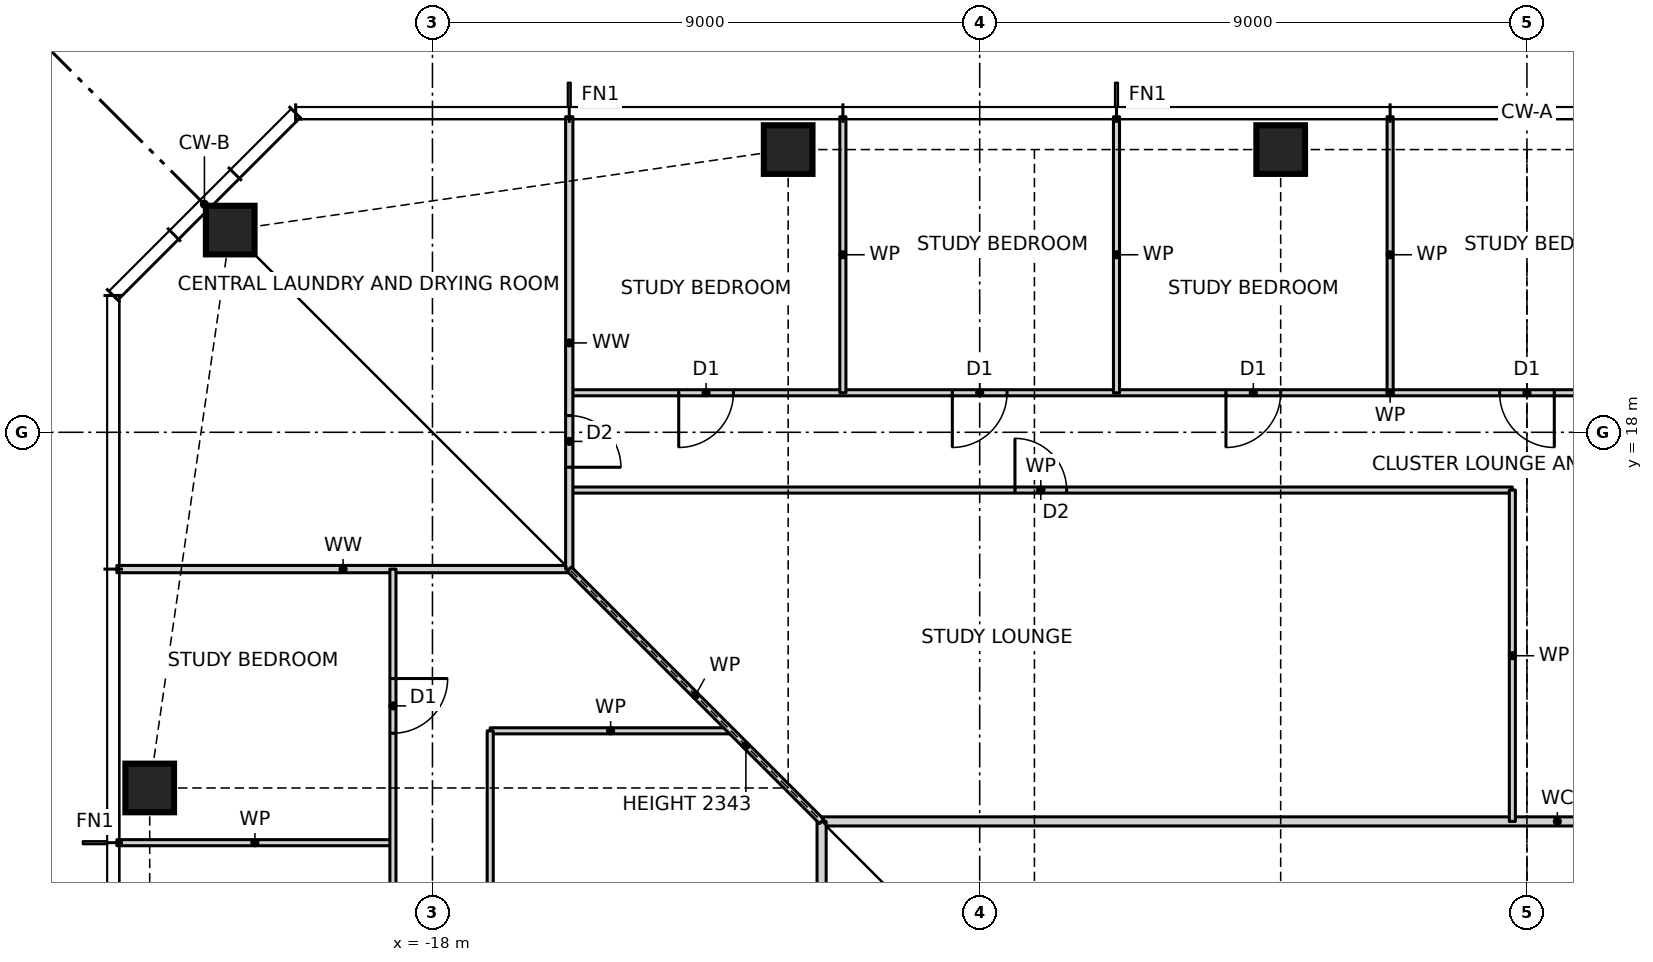
"""IFC4 building model, lengths in metres.
Left out: names, types, materials, properties, quantities, classifications, styles, units other than length and angle.
Written with IfcOpenShell. Run it as: python <this file> out.ifc"""

import sys

from ifc_helpers import new_model, si_unit, direction, frame, frame_2d, origin, origin_2d, place, context, subcontext, project, spatial, rectangle, hollow_rectangle, extrude, element, fill, save


model = new_model("IFC4")
c1 = context("Model", 3, precision=1e-05, world=origin(), true_north=direction((0.0, 1.0)))
c2 = subcontext(c1, "Body", "Model", "MODEL_VIEW")
j1 = project(units=[si_unit("LENGTHUNIT", "METRE"), si_unit("PLANEANGLEUNIT", "RADIAN")], contexts=[c1])
p1 = place(None, origin())
s1 = spatial("IfcSite", under=j1, at=p1, CompositionType="ELEMENT")
p2 = place(p1, origin())
s2 = spatial("IfcBuilding", under=s1, at=p2, CompositionType="ELEMENT")
p3 = place(p2, frame((0.0, 0.0, 25.5)))
s3 = spatial("IfcBuildingStorey", under=s2, at=p3, CompositionType="ELEMENT", Elevation=25.5)
for number, where, z_axis, x_axis in (
    (1, (-4.05, 22.65, 0.0), (0.0, 0.0, 1.0), (1.0, 0.0, 0.0)),
    (2, (-12.15, 22.65, 0.0), (0.0, 0.0, 1.0), (1.0, 0.0, 0.0)),
    (3, (-21.326, 21.326, 0.0), (0.0, 0.0, 1.0), (1.0, 0.0, 0.0)),
    (4, (-22.65, 12.15, 0.0), (0.0, 0.0, 1.0), (1.0, 0.0, 0.0)),
):
    element("IfcColumn", number, at=place(p3, frame(where, z_axis=z_axis, x_axis=x_axis)), inside=s3, PredefinedType="COLUMN", context=c2, shape_type="SweptSolid", body=[
        extrude(hollow_rectangle(XDim=0.8, YDim=0.8, WallThickness=0.09, at=origin_2d()), origin(), (0.0, 0.0, 1.0), 3.5),
    ])
p4 = place(p3, frame((-23.19, 11.25, 0.0), z_axis=(0.0, 0.0, 1.0), x_axis=(1.0, 0.0, 0.0)))
e5 = element("IfcWall", 5, at=p4, inside=s3, PredefinedType="PARTITIONING", context=c2, shape_type="SweptSolid", body=[
    extrude(rectangle(XDim=4.54, YDim=0.1, at=frame_2d((2.27, 0.0))), origin(), (0.0, 0.0, 1.0), 3.27),
])
p5 = place(p3, frame((-11.6, 11.6, 0.0), z_axis=(0.0, 0.0, 1.0), x_axis=(1.0, 0.0, 0.0)))
e6 = element("IfcWall", 6, at=p5, inside=s3, PredefinedType="PARTITIONING", context=c2, shape_type="SweptSolid", body=[
    extrude(rectangle(XDim=24.2, YDim=0.15, at=frame_2d((12.1, 0.0))), origin(), (0.0, 0.0, 1.0), 3.27),
])
p6 = place(p5, frame((12.855, 0.0, 0.0)))
e7 = element("IfcOpeningElement", 7, at=p6, cuts=e6, PredefinedType="OPENING", context=c2, shape_type="SweptSolid", body=[
    extrude(rectangle(XDim=1.0, YDim=2.1, at=frame_2d((0.5, 1.05))), frame((0.0, 0.085, 0.0), z_axis=(0.0, -1.0, 0.0), x_axis=(1.0, 0.0, 0.0)), (0.0, 0.0, 1.0), 0.17),
])
p7 = place(p3, frame((-17.05, 13.09, 0.0), z_axis=(0.0, 0.0, 1.0), x_axis=(1.0, 0.0, 0.0)))
e8 = element("IfcWall", 8, at=p7, inside=s3, PredefinedType="PARTITIONING", context=c2, shape_type="SweptSolid", body=[
    extrude(rectangle(XDim=3.96, YDim=0.1, at=frame_2d((1.98, 0.0))), origin(), (0.0, 0.0, 1.0), 3.27),
])
p8 = place(p3, frame((-23.19, 15.75, 0.0), z_axis=(0.0, 0.0, 1.0), x_axis=(1.0, 0.0, 0.0)))
e9 = element("IfcWall", 9, at=p8, inside=s3, PredefinedType="PARTITIONING", context=c2, shape_type="SweptSolid", body=[
    extrude(rectangle(XDim=7.44, YDim=0.12, at=frame_2d((3.72, 0.0))), origin(), (0.0, 0.0, 1.0), 3.27),
])
p9 = place(p3, frame((-15.75, 17.05, 0.0), z_axis=(0.0, 0.0, 1.0), x_axis=(1.0, 0.0, 0.0)))
e10 = element("IfcWall", 10, at=p9, inside=s3, PredefinedType="PARTITIONING", context=c2, shape_type="SweptSolid", body=[
    extrude(rectangle(XDim=15.51, YDim=0.1, at=frame_2d((7.755, 0.0))), origin(), (0.0, 0.0, 1.0), 3.27),
])
p10 = place(p9, frame((7.33, 0.0, 0.0)))
e11 = element("IfcOpeningElement", 11, at=p10, cuts=e10, PredefinedType="OPENING", context=c2, shape_type="SweptSolid", body=[
    extrude(rectangle(XDim=0.85, YDim=2.1, at=frame_2d((0.425, 1.05))), frame((0.0, 0.06, 0.0), z_axis=(0.0, -1.0, 0.0), x_axis=(1.0, 0.0, 0.0)), (0.0, 0.0, 1.0), 0.12),
])
p11 = place(p3, frame((-15.75, 18.65, 0.0), z_axis=(0.0, 0.0, 1.0), x_axis=(1.0, 0.0, 0.0)))
e12 = element("IfcWall", 12, at=p11, inside=s3, PredefinedType="PARTITIONING", context=c2, shape_type="SweptSolid", body=[
    extrude(rectangle(XDim=27.0, YDim=0.1, at=frame_2d((13.5, 0.0))), origin(), (0.0, 0.0, 1.0), 3.27),
])
p12 = place(p11, frame((24.3, 0.0, 0.0)))
e13 = element("IfcOpeningElement", 13, at=p12, cuts=e12, PredefinedType="OPENING", context=c2, shape_type="SweptSolid", body=[
    extrude(rectangle(XDim=0.9, YDim=2.1, at=frame_2d((0.45, 1.05))), frame((0.0, 0.06, 0.0), z_axis=(0.0, -1.0, 0.0), x_axis=(1.0, 0.0, 0.0)), (0.0, 0.0, 1.0), 0.12),
])
p13 = place(p11, frame((19.8, 0.0, 0.0)))
e14 = element("IfcOpeningElement", 14, at=p13, cuts=e12, PredefinedType="OPENING", context=c2, shape_type="SweptSolid", body=[
    extrude(rectangle(XDim=0.9, YDim=2.1, at=frame_2d((0.45, 1.05))), frame((0.0, 0.06, 0.0), z_axis=(0.0, -1.0, 0.0), x_axis=(1.0, 0.0, 0.0)), (0.0, 0.0, 1.0), 0.12),
])
p14 = place(p11, frame((15.3, 0.0, 0.0)))
e15 = element("IfcOpeningElement", 15, at=p14, cuts=e12, PredefinedType="OPENING", context=c2, shape_type="SweptSolid", body=[
    extrude(rectangle(XDim=0.9, YDim=2.1, at=frame_2d((0.45, 1.05))), frame((0.0, 0.06, 0.0), z_axis=(0.0, -1.0, 0.0), x_axis=(1.0, 0.0, 0.0)), (0.0, 0.0, 1.0), 0.12),
])
p15 = place(p11, frame((10.8, 0.0, 0.0)))
e16 = element("IfcOpeningElement", 16, at=p15, cuts=e12, PredefinedType="OPENING", context=c2, shape_type="SweptSolid", body=[
    extrude(rectangle(XDim=0.9, YDim=2.1, at=frame_2d((0.45, 1.05))), frame((0.0, 0.06, 0.0), z_axis=(0.0, -1.0, 0.0), x_axis=(1.0, 0.0, 0.0)), (0.0, 0.0, 1.0), 0.12),
])
p16 = place(p11, frame((6.3, 0.0, 0.0)))
e17 = element("IfcOpeningElement", 17, at=p16, cuts=e12, PredefinedType="OPENING", context=c2, shape_type="SweptSolid", body=[
    extrude(rectangle(XDim=0.9, YDim=2.1, at=frame_2d((0.45, 1.05))), frame((0.0, 0.06, 0.0), z_axis=(0.0, -1.0, 0.0), x_axis=(1.0, 0.0, 0.0)), (0.0, 0.0, 1.0), 0.12),
])
p17 = place(p11, frame((1.8, 0.0, 0.0)))
e18 = element("IfcOpeningElement", 18, at=p17, cuts=e12, PredefinedType="OPENING", context=c2, shape_type="SweptSolid", body=[
    extrude(rectangle(XDim=0.9, YDim=2.1, at=frame_2d((0.45, 1.05))), frame((0.0, 0.06, 0.0), z_axis=(0.0, -1.0, 0.0), x_axis=(1.0, 0.0, 0.0)), (0.0, 0.0, 1.0), 0.12),
])
p18 = place(p3, frame((-0.24, 11.6, 0.0), z_axis=(0.0, 0.0, 1.0), x_axis=(0.0, 1.0, 0.0)))
e19 = element("IfcWall", 19, at=p18, inside=s3, PredefinedType="PARTITIONING", context=c2, shape_type="SweptSolid", body=[
    extrude(rectangle(XDim=5.45, YDim=0.1, at=frame_2d((2.725, 0.0))), origin(), (0.0, 0.0, 1.0), 3.27),
])
for number, where, z_axis, x_axis in (
    (20, (-2.25, 18.65, 0.0), (0.0, 0.0, 1.0), (0.0, 1.0, 0.0)),
    (21, (-6.75, 18.65, 0.0), (0.0, 0.0, 1.0), (0.0, 1.0, 0.0)),
    (22, (-11.25, 18.65, 0.0), (0.0, 0.0, 1.0), (0.0, 1.0, 0.0)),
):
    element("IfcWall", number, at=place(p3, frame(where, z_axis=z_axis, x_axis=x_axis)), inside=s3, PredefinedType="PARTITIONING", context=c2, shape_type="SweptSolid", body=[
        extrude(rectangle(XDim=4.54, YDim=0.1, at=frame_2d((2.27, 0.0))), origin(), (0.0, 0.0, 1.0), 3.27),
    ])
p19 = place(p3, frame((-11.6, -11.6, 0.0), z_axis=(0.0, 0.0, 1.0), x_axis=(0.0, 1.0, 0.0)))
e23 = element("IfcWall", 23, at=p19, inside=s3, PredefinedType="PARTITIONING", context=c2, shape_type="SweptSolid", body=[
    extrude(rectangle(XDim=23.2, YDim=0.15, at=frame_2d((11.6, 0.0))), origin(), (0.0, 0.0, 1.0), 3.27),
])
p20 = place(p19, frame((1.65, 0.0, 0.0)))
e24 = element("IfcOpeningElement", 24, at=p20, cuts=e23, PredefinedType="OPENING", context=c2, shape_type="SweptSolid", body=[
    extrude(rectangle(XDim=1.0, YDim=2.1, at=frame_2d((0.5, 1.05))), frame((0.0, 0.085, 0.0), z_axis=(0.0, -1.0, 0.0), x_axis=(1.0, 0.0, 0.0)), (0.0, 0.0, 1.0), 0.17),
])
p21 = place(p3, frame((-15.75, 15.75, 0.0), z_axis=(0.0, 0.0, 1.0), x_axis=(0.0, 1.0, 0.0)))
e25 = element("IfcWall", 25, at=p21, inside=s3, PredefinedType="PARTITIONING", context=c2, shape_type="SweptSolid", body=[
    extrude(rectangle(XDim=7.44, YDim=0.12, at=frame_2d((3.72, 0.0))), origin(), (0.0, 0.0, 1.0), 3.27),
])
p22 = place(p21, frame((1.675, 0.0, 0.0)))
e26 = element("IfcOpeningElement", 26, at=p22, cuts=e25, PredefinedType="OPENING", context=c2, shape_type="SweptSolid", body=[
    extrude(rectangle(XDim=0.85, YDim=2.1, at=frame_2d((0.425, 1.05))), frame((0.0, 0.07, 0.0), z_axis=(0.0, -1.0, 0.0), x_axis=(1.0, 0.0, 0.0)), (0.0, 0.0, 1.0), 0.14),
])
p23 = place(p3, frame((-17.05, -8.25, 0.0), z_axis=(0.0, 0.0, 1.0), x_axis=(0.0, 1.0, 0.0)))
e27 = element("IfcWall", 27, at=p23, inside=s3, PredefinedType="PARTITIONING", context=c2, shape_type="SweptSolid", body=[
    extrude(rectangle(XDim=21.34, YDim=0.1, at=frame_2d((10.67, 0.0))), origin(), (0.0, 0.0, 1.0), 3.27),
])
p24 = place(p23, frame((15.58, 0.0, 0.0)))
e28 = element("IfcOpeningElement", 28, at=p24, cuts=e27, PredefinedType="OPENING", context=c2, shape_type="SweptSolid", body=[
    extrude(rectangle(XDim=0.85, YDim=2.1, at=frame_2d((0.425, 1.05))), frame((0.0, 0.06, 0.0), z_axis=(0.0, -1.0, 0.0), x_axis=(1.0, 0.0, 0.0)), (0.0, 0.0, 1.0), 0.12),
])
p25 = place(p23, frame((4.91, 0.0, 0.0)))
e29 = element("IfcOpeningElement", 29, at=p25, cuts=e27, PredefinedType="OPENING", context=c2, shape_type="SweptSolid", body=[
    extrude(rectangle(XDim=0.85, YDim=2.1, at=frame_2d((0.425, 1.05))), frame((0.0, 0.06, 0.0), z_axis=(0.0, -1.0, 0.0), x_axis=(1.0, 0.0, 0.0)), (0.0, 0.0, 1.0), 0.12),
])
p26 = place(p3, frame((-18.65, -15.75, 0.0), z_axis=(0.0, 0.0, 1.0), x_axis=(0.0, 1.0, 0.0)))
e30 = element("IfcWall", 30, at=p26, inside=s3, PredefinedType="PARTITIONING", context=c2, shape_type="SweptSolid", body=[
    extrude(rectangle(XDim=31.5, YDim=0.1, at=frame_2d((15.75, 0.0))), origin(), (0.0, 0.0, 1.0), 3.27),
])
p27 = place(p26, frame((28.8, 0.0, 0.0)))
e31 = element("IfcOpeningElement", 31, at=p27, cuts=e30, PredefinedType="OPENING", context=c2, shape_type="SweptSolid", body=[
    extrude(rectangle(XDim=0.9, YDim=2.1, at=frame_2d((0.45, 1.05))), frame((0.0, 0.06, 0.0), z_axis=(0.0, -1.0, 0.0), x_axis=(1.0, 0.0, 0.0)), (0.0, 0.0, 1.0), 0.12),
])
p28 = place(p26, frame((24.3, 0.0, 0.0)))
e32 = element("IfcOpeningElement", 32, at=p28, cuts=e30, PredefinedType="OPENING", context=c2, shape_type="SweptSolid", body=[
    extrude(rectangle(XDim=0.9, YDim=2.1, at=frame_2d((0.45, 1.05))), frame((0.0, 0.06, 0.0), z_axis=(0.0, -1.0, 0.0), x_axis=(1.0, 0.0, 0.0)), (0.0, 0.0, 1.0), 0.12),
])
p29 = place(p26, frame((19.8, 0.0, 0.0)))
e33 = element("IfcOpeningElement", 33, at=p29, cuts=e30, PredefinedType="OPENING", context=c2, shape_type="SweptSolid", body=[
    extrude(rectangle(XDim=0.9, YDim=2.1, at=frame_2d((0.45, 1.05))), frame((0.0, 0.06, 0.0), z_axis=(0.0, -1.0, 0.0), x_axis=(1.0, 0.0, 0.0)), (0.0, 0.0, 1.0), 0.12),
])
p30 = place(p26, frame((15.3, 0.0, 0.0)))
e34 = element("IfcOpeningElement", 34, at=p30, cuts=e30, PredefinedType="OPENING", context=c2, shape_type="SweptSolid", body=[
    extrude(rectangle(XDim=0.9, YDim=2.1, at=frame_2d((0.45, 1.05))), frame((0.0, 0.06, 0.0), z_axis=(0.0, -1.0, 0.0), x_axis=(1.0, 0.0, 0.0)), (0.0, 0.0, 1.0), 0.12),
])
p31 = place(p26, frame((10.8, 0.0, 0.0)))
e35 = element("IfcOpeningElement", 35, at=p31, cuts=e30, PredefinedType="OPENING", context=c2, shape_type="SweptSolid", body=[
    extrude(rectangle(XDim=0.9, YDim=2.1, at=frame_2d((0.45, 1.05))), frame((0.0, 0.06, 0.0), z_axis=(0.0, -1.0, 0.0), x_axis=(1.0, 0.0, 0.0)), (0.0, 0.0, 1.0), 0.12),
])
p32 = place(p26, frame((6.3, 0.0, 0.0)))
e36 = element("IfcOpeningElement", 36, at=p32, cuts=e30, PredefinedType="OPENING", context=c2, shape_type="SweptSolid", body=[
    extrude(rectangle(XDim=0.9, YDim=2.1, at=frame_2d((0.45, 1.05))), frame((0.0, 0.06, 0.0), z_axis=(0.0, -1.0, 0.0), x_axis=(1.0, 0.0, 0.0)), (0.0, 0.0, 1.0), 0.12),
])
p33 = place(p26, frame((1.8, 0.0, 0.0)))
e37 = element("IfcOpeningElement", 37, at=p33, cuts=e30, PredefinedType="OPENING", context=c2, shape_type="SweptSolid", body=[
    extrude(rectangle(XDim=0.9, YDim=2.1, at=frame_2d((0.45, 1.05))), frame((0.0, 0.06, 0.0), z_axis=(0.0, -1.0, 0.0), x_axis=(1.0, 0.0, 0.0)), (0.0, 0.0, 1.0), 0.12),
])
p34 = place(p3, frame((-11.6, 11.6, 0.0), z_axis=(0.0, 0.0, 1.0), x_axis=(-0.707106781187, 0.707106781187, 0.0)))
e38 = element("IfcWall", 38, at=p34, inside=s3, PredefinedType="PARTITIONING", context=c2, shape_type="SweptSolid", body=[
    extrude(rectangle(XDim=5.869, YDim=0.1, at=frame_2d((2.935, 0.0))), origin(), (0.0, 0.0, 1.0), 2.343),
])
p35 = place(p14, frame((0.9, 0.0, 0.0), z_axis=(0.0, 0.0, 1.0), x_axis=(-1.0, 0.0, 0.0)))
e39 = element("IfcDoor", 39, at=p35, inside=s3, OperationType="SINGLE_SWING_LEFT", PredefinedType="DOOR", context=c2, shape_type="SweptSolid", body=[
    extrude(rectangle(XDim=0.9, YDim=2.1, at=frame_2d((0.45, 1.05))), frame((0.0, 0.025, 0.0), z_axis=(0.0, -1.0, 0.0), x_axis=(1.0, 0.0, 0.0)), (0.0, 0.0, 1.0), 0.05),
])
fill(e15, e39)
p36 = place(p15, frame((0.9, 0.0, 0.0), z_axis=(0.0, 0.0, 1.0), x_axis=(-1.0, 0.0, 0.0)))
e40 = element("IfcDoor", 40, at=p36, inside=s3, OperationType="SINGLE_SWING_RIGHT", PredefinedType="DOOR", context=c2, shape_type="SweptSolid", body=[
    extrude(rectangle(XDim=0.9, YDim=2.1, at=frame_2d((0.45, 1.05))), frame((0.0, 0.025, 0.0), z_axis=(0.0, -1.0, 0.0), x_axis=(1.0, 0.0, 0.0)), (0.0, 0.0, 1.0), 0.05),
])
fill(e16, e40)
p37 = place(p16, frame((0.9, 0.0, 0.0), z_axis=(0.0, 0.0, 1.0), x_axis=(-1.0, 0.0, 0.0)))
e41 = element("IfcDoor", 41, at=p37, inside=s3, OperationType="SINGLE_SWING_RIGHT", PredefinedType="DOOR", context=c2, shape_type="SweptSolid", body=[
    extrude(rectangle(XDim=0.9, YDim=2.1, at=frame_2d((0.45, 1.05))), frame((0.0, 0.025, 0.0), z_axis=(0.0, -1.0, 0.0), x_axis=(1.0, 0.0, 0.0)), (0.0, 0.0, 1.0), 0.05),
])
fill(e17, e41)
p38 = place(p17, frame((0.9, 0.0, 0.0), z_axis=(0.0, 0.0, 1.0), x_axis=(-1.0, 0.0, 0.0)))
e42 = element("IfcDoor", 42, at=p38, inside=s3, OperationType="SINGLE_SWING_RIGHT", PredefinedType="DOOR", context=c2, shape_type="SweptSolid", body=[
    extrude(rectangle(XDim=0.9, YDim=2.1, at=frame_2d((0.45, 1.05))), frame((0.0, 0.025, 0.0), z_axis=(0.0, -1.0, 0.0), x_axis=(1.0, 0.0, 0.0)), (0.0, 0.0, 1.0), 0.05),
])
fill(e18, e42)
p39 = place(p10, origin())
e43 = element("IfcDoor", 43, at=p39, inside=s3, OperationType="SINGLE_SWING_LEFT", PredefinedType="DOOR", context=c2, shape_type="SweptSolid", body=[
    extrude(rectangle(XDim=0.85, YDim=2.1, at=frame_2d((0.425, 1.05))), frame((0.0, 0.025, 0.0), z_axis=(0.0, -1.0, 0.0), x_axis=(1.0, 0.0, 0.0)), (0.0, 0.0, 1.0), 0.05),
])
fill(e11, e43)
p40 = place(p27, frame((0.9, 0.0, 0.0), z_axis=(0.0, 0.0, 1.0), x_axis=(-1.0, 0.0, 0.0)))
e44 = element("IfcDoor", 44, at=p40, inside=s3, OperationType="SINGLE_SWING_LEFT", PredefinedType="DOOR", context=c2, shape_type="SweptSolid", body=[
    extrude(rectangle(XDim=0.9, YDim=2.1, at=frame_2d((0.45, 1.05))), frame((0.0, 0.025, 0.0), z_axis=(0.0, -1.0, 0.0), x_axis=(1.0, 0.0, 0.0)), (0.0, 0.0, 1.0), 0.05),
])
fill(e31, e44)
p41 = place(p22, frame((0.85, 0.0, 0.0), z_axis=(0.0, 0.0, 1.0), x_axis=(-1.0, 0.0, 0.0)))
e45 = element("IfcDoor", 45, at=p41, inside=s3, OperationType="SINGLE_SWING_RIGHT", PredefinedType="DOOR", context=c2, shape_type="SweptSolid", body=[
    extrude(rectangle(XDim=0.85, YDim=2.1, at=frame_2d((0.425, 1.05))), frame((0.0, 0.025, 0.0), z_axis=(0.0, -1.0, 0.0), x_axis=(1.0, 0.0, 0.0)), (0.0, 0.0, 1.0), 0.05),
])
fill(e26, e45)
save(model, sys.argv[1])
